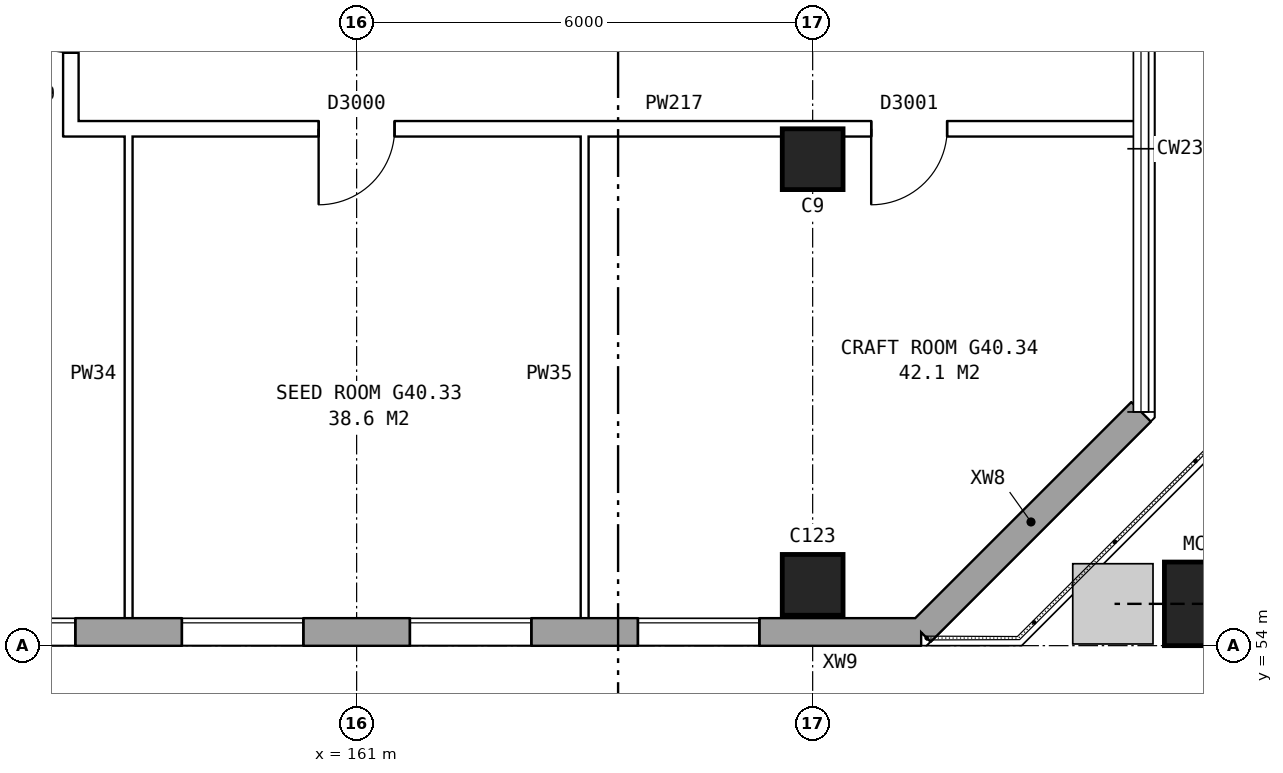
"""IFC4 building model, lengths in metres.
Left out: names, types, materials, properties, quantities, classifications, styles, units other than length and angle.
Written with IfcOpenShell. Run it as: python <this file> out.ifc"""

import sys

from ifc_helpers import new_model, si_unit, direction, frame, frame_2d, origin, origin_2d, place, context, subcontext, project, spatial, rectangle, hollow_rectangle, extrude, element, fill, save


model = new_model("IFC4")
c1 = context("Model", 3, precision=1e-05, world=origin(), true_north=direction((0.0, 1.0)))
c2 = subcontext(c1, "Body", "Model", "MODEL_VIEW")
j1 = project(units=[si_unit("LENGTHUNIT", "METRE"), si_unit("PLANEANGLEUNIT", "RADIAN")], contexts=[c1])
p1 = place(None, origin())
s1 = spatial("IfcSite", under=j1, at=p1, CompositionType="ELEMENT")
p2 = place(p1, origin())
s2 = spatial("IfcBuilding", under=s1, at=p2, CompositionType="ELEMENT")
p3 = place(p2, frame((0.0, 0.0, 142.3)))
s3 = spatial("IfcBuildingStorey", under=s2, at=p3, CompositionType="ELEMENT", Elevation=142.3)
for number, where, z_axis, x_axis in (
    (1, (167.0, 54.8, 0.0), (0.0, 0.0, 1.0), (1.0, 0.0, 0.0)),
    (2, (167.0, 60.4, 0.0), (0.0, 0.0, 1.0), (1.0, 0.0, 0.0)),
):
    element("IfcColumn", number, at=place(p3, frame(where, z_axis=z_axis, x_axis=x_axis)), inside=s3, PredefinedType="COLUMN", context=c2, shape_type="SweptSolid", body=[
        extrude(rectangle(XDim=0.8, YDim=0.8, at=origin_2d()), origin(), (0.0, 0.0, 1.0), 5.6),
    ])
p4 = place(p3, frame((172.178, 54.55, 0.109), z_axis=(-0.19761602731, 0.0, 0.980279503892), x_axis=(0.0, -1.0, 0.0)))
e3 = element("IfcColumn", 3, at=p4, inside=s3, PredefinedType="COLUMN", context=c2, shape_type="SweptSolid", body=[
    extrude(hollow_rectangle(XDim=1.1, YDim=1.1, WallThickness=0.06, at=origin_2d()), origin(), (0.0, 0.0, 1.0), 6.103),
])
p5 = place(p3, frame((134.075, 54.18, 0.0), z_axis=(0.0, 0.0, 1.0), x_axis=(1.0, 0.0, 0.0)))
e4 = element("IfcWall", 4, at=p5, inside=s3, PredefinedType="STANDARD", context=c2, shape_type="SweptSolid", body=[
    extrude(rectangle(XDim=34.351, YDim=0.36, at=frame_2d((17.175, 0.0))), origin(), (0.0, 0.0, 1.0), 5.6),
])
p6 = place(p5, frame((0.625, 0.0, 0.15)))
e5 = element("IfcOpeningElement", 5, at=p6, cuts=e4, PredefinedType="OPENING", context=c2, shape_type="SweptSolid", body=[
    extrude(rectangle(XDim=1.6, YDim=2.4, at=frame_2d((0.8, 1.2))), frame((0.0, 0.19, 0.0), z_axis=(0.0, -1.0, 0.0), x_axis=(1.0, 0.0, 0.0)), (0.0, 0.0, 1.0), 0.38),
])
p7 = place(p5, frame((3.625, 0.0, 0.15)))
e6 = element("IfcOpeningElement", 6, at=p7, cuts=e4, PredefinedType="OPENING", context=c2, shape_type="SweptSolid", body=[
    extrude(rectangle(XDim=1.6, YDim=2.4, at=frame_2d((0.8, 1.2))), frame((0.0, 0.19, 0.0), z_axis=(0.0, -1.0, 0.0), x_axis=(1.0, 0.0, 0.0)), (0.0, 0.0, 1.0), 0.38),
])
p8 = place(p5, frame((6.625, 0.0, 0.15)))
e7 = element("IfcOpeningElement", 7, at=p8, cuts=e4, PredefinedType="OPENING", context=c2, shape_type="SweptSolid", body=[
    extrude(rectangle(XDim=1.6, YDim=2.4, at=frame_2d((0.8, 1.2))), frame((0.0, 0.19, 0.0), z_axis=(0.0, -1.0, 0.0), x_axis=(1.0, 0.0, 0.0)), (0.0, 0.0, 1.0), 0.38),
])
p9 = place(p5, frame((9.625, 0.0, 0.15)))
e8 = element("IfcOpeningElement", 8, at=p9, cuts=e4, PredefinedType="OPENING", context=c2, shape_type="SweptSolid", body=[
    extrude(rectangle(XDim=1.6, YDim=2.4, at=frame_2d((0.8, 1.2))), frame((0.0, 0.19, 0.0), z_axis=(0.0, -1.0, 0.0), x_axis=(1.0, 0.0, 0.0)), (0.0, 0.0, 1.0), 0.38),
])
p10 = place(p5, frame((12.625, 0.0, 0.15)))
e9 = element("IfcOpeningElement", 9, at=p10, cuts=e4, PredefinedType="OPENING", context=c2, shape_type="SweptSolid", body=[
    extrude(rectangle(XDim=1.6, YDim=2.4, at=frame_2d((0.8, 1.2))), frame((0.0, 0.19, 0.0), z_axis=(0.0, -1.0, 0.0), x_axis=(1.0, 0.0, 0.0)), (0.0, 0.0, 1.0), 0.38),
])
p11 = place(p5, frame((15.625, 0.0, 0.15)))
e10 = element("IfcOpeningElement", 10, at=p11, cuts=e4, PredefinedType="OPENING", context=c2, shape_type="SweptSolid", body=[
    extrude(rectangle(XDim=1.6, YDim=2.4, at=frame_2d((0.8, 1.2))), frame((0.0, 0.19, 0.0), z_axis=(0.0, -1.0, 0.0), x_axis=(1.0, 0.0, 0.0)), (0.0, 0.0, 1.0), 0.38),
])
p12 = place(p5, frame((18.625, 0.0, 0.15)))
e11 = element("IfcOpeningElement", 11, at=p12, cuts=e4, PredefinedType="OPENING", context=c2, shape_type="SweptSolid", body=[
    extrude(rectangle(XDim=1.6, YDim=2.4, at=frame_2d((0.8, 1.2))), frame((0.0, 0.19, 0.0), z_axis=(0.0, -1.0, 0.0), x_axis=(1.0, 0.0, 0.0)), (0.0, 0.0, 1.0), 0.38),
])
p13 = place(p5, frame((21.625, 0.0, 0.15)))
e12 = element("IfcOpeningElement", 12, at=p13, cuts=e4, PredefinedType="OPENING", context=c2, shape_type="SweptSolid", body=[
    extrude(rectangle(XDim=1.6, YDim=2.4, at=frame_2d((0.8, 1.2))), frame((0.0, 0.19, 0.0), z_axis=(0.0, -1.0, 0.0), x_axis=(1.0, 0.0, 0.0)), (0.0, 0.0, 1.0), 0.38),
])
p14 = place(p5, frame((24.625, 0.0, 0.15)))
e13 = element("IfcOpeningElement", 13, at=p14, cuts=e4, PredefinedType="OPENING", context=c2, shape_type="SweptSolid", body=[
    extrude(rectangle(XDim=1.6, YDim=2.4, at=frame_2d((0.8, 1.2))), frame((0.0, 0.19, 0.0), z_axis=(0.0, -1.0, 0.0), x_axis=(1.0, 0.0, 0.0)), (0.0, 0.0, 1.0), 0.38),
])
p15 = place(p5, frame((27.625, 0.0, 0.15)))
e14 = element("IfcOpeningElement", 14, at=p15, cuts=e4, PredefinedType="OPENING", context=c2, shape_type="SweptSolid", body=[
    extrude(rectangle(XDim=1.6, YDim=2.4, at=frame_2d((0.8, 1.2))), frame((0.0, 0.19, 0.0), z_axis=(0.0, -1.0, 0.0), x_axis=(1.0, 0.0, 0.0)), (0.0, 0.0, 1.0), 0.38),
])
p16 = place(p5, frame((30.625, 0.0, 0.15)))
e15 = element("IfcOpeningElement", 15, at=p16, cuts=e4, PredefinedType="OPENING", context=c2, shape_type="SweptSolid", body=[
    extrude(rectangle(XDim=1.6, YDim=2.4, at=frame_2d((0.8, 1.2))), frame((0.0, 0.19, 0.0), z_axis=(0.0, -1.0, 0.0), x_axis=(1.0, 0.0, 0.0)), (0.0, 0.0, 1.0), 0.38),
])
p17 = place(p3, frame((168.425, 54.18, 0.0), z_axis=(0.0, 0.0, 1.0), x_axis=(0.707106781187, 0.707106781187, 0.0)))
e16 = element("IfcWall", 16, at=p17, inside=s3, PredefinedType="STANDARD", context=c2, shape_type="SweptSolid", body=[
    extrude(rectangle(XDim=4.094, YDim=0.36, at=frame_2d((2.047, 0.0))), origin(), (0.0, 0.0, 1.0), 5.6),
])
p18 = place(p3, frame((157.14, 60.8, 0.0), z_axis=(0.0, 0.0, 1.0), x_axis=(1.0, 0.0, 0.0)))
e17 = element("IfcWall", 17, at=p18, inside=s3, PredefinedType="PARTITIONING", context=c2, shape_type="SweptSolid", body=[
    extrude(rectangle(XDim=14.12, YDim=0.2, at=frame_2d((7.06, 0.0))), origin(), (0.0, 0.0, 1.0), 5.6),
])
p19 = place(p18, frame((3.36, 0.0, 0.0)))
e18 = element("IfcOpeningElement", 18, at=p19, cuts=e17, PredefinedType="OPENING", context=c2, shape_type="SweptSolid", body=[
    extrude(rectangle(XDim=1.0, YDim=2.1, at=frame_2d((0.5, 1.05))), frame((0.0, 0.11, 0.0), z_axis=(0.0, -1.0, 0.0), x_axis=(1.0, 0.0, 0.0)), (0.0, 0.0, 1.0), 0.22),
])
p20 = place(p18, frame((10.63, 0.0, 0.0)))
e19 = element("IfcOpeningElement", 19, at=p20, cuts=e17, PredefinedType="OPENING", context=c2, shape_type="SweptSolid", body=[
    extrude(rectangle(XDim=1.0, YDim=2.1, at=frame_2d((0.5, 1.05))), frame((0.0, 0.11, 0.0), z_axis=(0.0, -1.0, 0.0), x_axis=(1.0, 0.0, 0.0)), (0.0, 0.0, 1.0), 0.22),
])
p21 = place(p3, frame((157.24, 60.7, 0.0), z_axis=(0.0, 0.0, 1.0), x_axis=(0.0, 1.0, 0.0)))
e20 = element("IfcWall", 20, at=p21, inside=s3, PredefinedType="PARTITIONING", context=c2, shape_type="SweptSolid", body=[
    extrude(rectangle(XDim=3.2, YDim=0.2, at=frame_2d((1.6, 0.0))), origin(), (0.0, 0.0, 1.0), 5.6),
])
p22 = place(p21, frame((1.1, 0.0, 0.0)))
e21 = element("IfcOpeningElement", 21, at=p22, cuts=e20, PredefinedType="OPENING", context=c2, shape_type="SweptSolid", body=[
    extrude(rectangle(XDim=1.0, YDim=2.1, at=frame_2d((0.5, 1.05))), frame((0.0, 0.11, 0.0), z_axis=(0.0, -1.0, 0.0), x_axis=(1.0, 0.0, 0.0)), (0.0, 0.0, 1.0), 0.22),
])
for number, where, z_axis, x_axis in (
    (22, (158.0, 54.24, 0.0), (0.0, 0.0, 1.0), (0.0, 1.0, 0.0)),
    (23, (164.0, 54.24, 0.0), (0.0, 0.0, 1.0), (0.0, 1.0, 0.0)),
):
    element("IfcWall", number, at=place(p3, frame(where, z_axis=z_axis, x_axis=x_axis)), inside=s3, PredefinedType="PARTITIONING", context=c2, shape_type="SweptSolid", body=[
        extrude(rectangle(XDim=6.66, YDim=0.1, at=frame_2d((3.33, 0.0))), origin(), (0.0, 0.0, 1.0), 5.6),
    ])
p23 = place(p13, origin())
e24 = element("IfcWindow", 24, at=p23, inside=s3, PartitioningType="SINGLE_PANEL", PredefinedType="WINDOW", context=c2, shape_type="SweptSolid", body=[
    extrude(rectangle(XDim=1.6, YDim=2.4, at=frame_2d((0.8, 1.2))), frame((0.0, 0.15, 0.0), z_axis=(0.0, -1.0, 0.0), x_axis=(1.0, 0.0, 0.0)), (0.0, 0.0, 1.0), 0.06),
])
fill(e12, e24)
p24 = place(p14, origin())
e25 = element("IfcWindow", 25, at=p24, inside=s3, PartitioningType="SINGLE_PANEL", PredefinedType="WINDOW", context=c2, shape_type="SweptSolid", body=[
    extrude(rectangle(XDim=1.6, YDim=2.4, at=frame_2d((0.8, 1.2))), frame((0.0, 0.15, 0.0), z_axis=(0.0, -1.0, 0.0), x_axis=(1.0, 0.0, 0.0)), (0.0, 0.0, 1.0), 0.06),
])
fill(e13, e25)
p25 = place(p15, origin())
e26 = element("IfcWindow", 26, at=p25, inside=s3, PartitioningType="SINGLE_PANEL", PredefinedType="WINDOW", context=c2, shape_type="SweptSolid", body=[
    extrude(rectangle(XDim=1.6, YDim=2.4, at=frame_2d((0.8, 1.2))), frame((0.0, 0.15, 0.0), z_axis=(0.0, -1.0, 0.0), x_axis=(1.0, 0.0, 0.0)), (0.0, 0.0, 1.0), 0.06),
])
fill(e14, e26)
p26 = place(p16, origin())
e27 = element("IfcWindow", 27, at=p26, inside=s3, PartitioningType="SINGLE_PANEL", PredefinedType="WINDOW", context=c2, shape_type="SweptSolid", body=[
    extrude(rectangle(XDim=1.6, YDim=2.4, at=frame_2d((0.8, 1.2))), frame((0.0, 0.15, 0.0), z_axis=(0.0, -1.0, 0.0), x_axis=(1.0, 0.0, 0.0)), (0.0, 0.0, 1.0), 0.06),
])
fill(e15, e27)
p27 = place(p19, frame((1.0, 0.0, 0.0), z_axis=(0.0, 0.0, 1.0), x_axis=(-1.0, 0.0, 0.0)))
e28 = element("IfcDoor", 28, at=p27, inside=s3, OperationType="SINGLE_SWING_RIGHT", PredefinedType="DOOR", context=c2, shape_type="SweptSolid", body=[
    extrude(rectangle(XDim=1.0, YDim=2.1, at=frame_2d((0.5, 1.05))), frame((0.0, 0.025, 0.0), z_axis=(0.0, -1.0, 0.0), x_axis=(1.0, 0.0, 0.0)), (0.0, 0.0, 1.0), 0.05),
])
fill(e18, e28)
p28 = place(p20, frame((1.0, 0.0, 0.0), z_axis=(0.0, 0.0, 1.0), x_axis=(-1.0, 0.0, 0.0)))
e29 = element("IfcDoor", 29, at=p28, inside=s3, OperationType="SINGLE_SWING_RIGHT", PredefinedType="DOOR", context=c2, shape_type="SweptSolid", body=[
    extrude(rectangle(XDim=1.0, YDim=2.1, at=frame_2d((0.5, 1.05))), frame((0.0, 0.025, 0.0), z_axis=(0.0, -1.0, 0.0), x_axis=(1.0, 0.0, 0.0)), (0.0, 0.0, 1.0), 0.05),
])
fill(e19, e29)
save(model, sys.argv[1])
